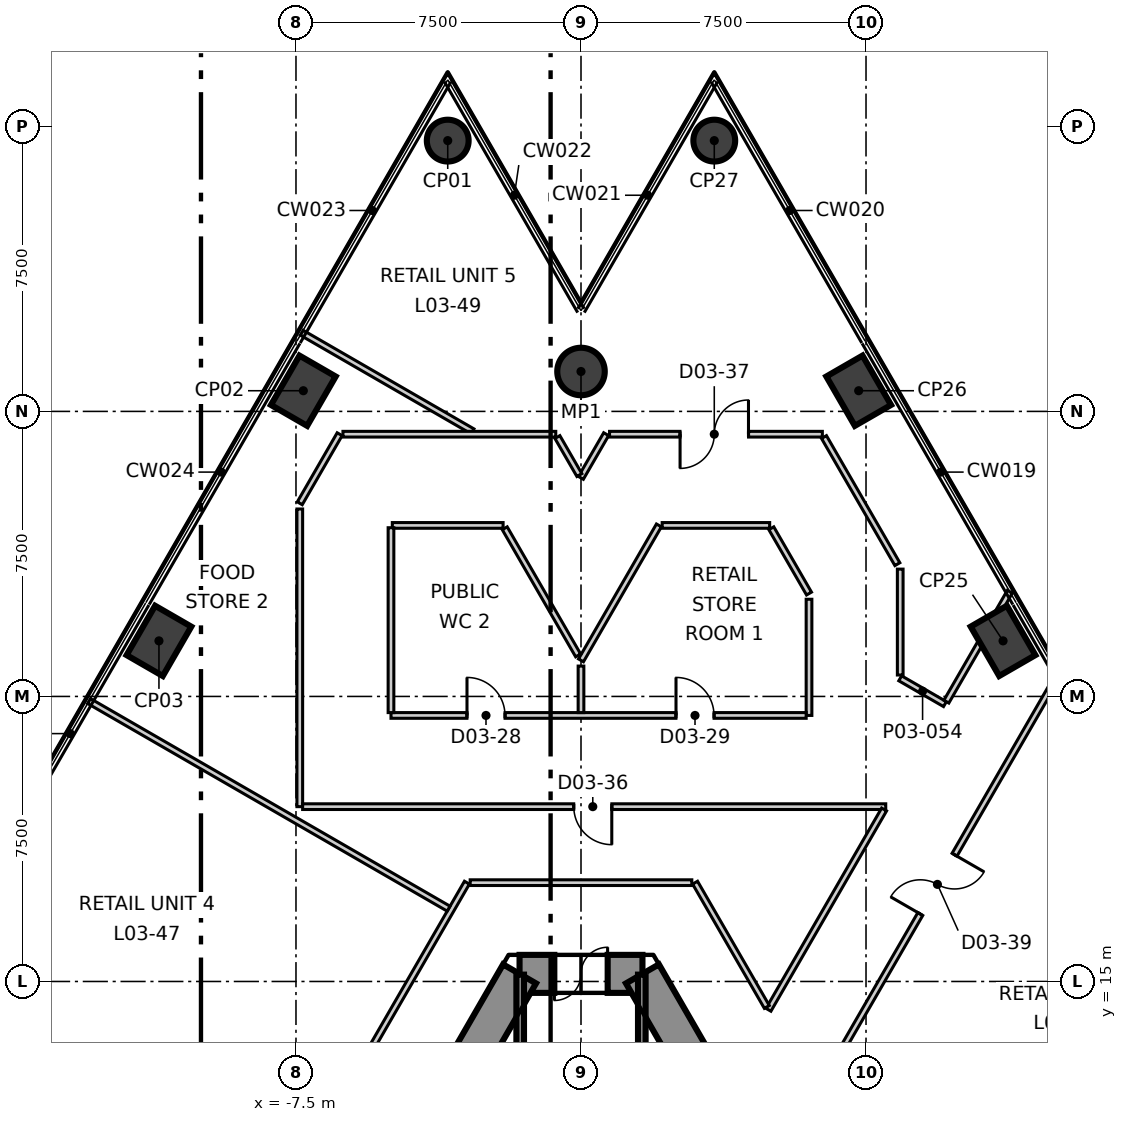
"""IFC4 building model, lengths in metres.
Left out: names, types, materials, properties, quantities, classifications, styles, units other than length and angle.
Written with IfcOpenShell. Run it as: python <this file> out.ifc"""

import sys

from ifc_helpers import new_model, si_unit, direction, frame, frame_2d, origin, origin_2d, place, context, subcontext, project, spatial, polyline, rectangle, circle, outline, extrude, element, fill, save


model = new_model("IFC4")
c1 = context("Model", 3, precision=1e-05, world=origin(), true_north=direction((0.0, 1.0)))
c2 = subcontext(c1, "Body", "Model", "MODEL_VIEW")
j1 = project(units=[si_unit("LENGTHUNIT", "METRE"), si_unit("PLANEANGLEUNIT", "RADIAN")], contexts=[c1])
p1 = place(None, origin())
s1 = spatial("IfcSite", under=j1, at=p1, CompositionType="ELEMENT")
p2 = place(p1, origin())
s2 = spatial("IfcBuilding", under=s1, at=p2, CompositionType="ELEMENT")
p3 = place(p2, frame((0.0, 0.0, 19.9)))
s3 = spatial("IfcBuildingStorey", under=s2, at=p3, CompositionType="ELEMENT", Elevation=19.9)
p4 = place(p3, frame((1.617, 15.2, -0.4), z_axis=(0.0, 0.0, 1.0), x_axis=(-1.0, 0.0, 0.0)))
e1 = element("IfcWall", 1, at=p4, inside=s3, PredefinedType="SHEAR", context=c2, shape_type="SweptSolid", body=[
    extrude(outline(polyline([(-0.288, -0.5), (1.617, -0.5), (3.522, -0.5), (2.945, 0.5), (1.617, 0.5), (0.289, 0.5), (-0.288, -0.5)])), origin(), (0.0, 0.0, 1.0), 5.4),
])
p5 = place(p4, frame((0.917, 0.0, 0.4)))
e2 = element("IfcOpeningElement", 2, at=p5, cuts=e1, PredefinedType="OPENING", context=c2, shape_type="SweptSolid", body=[
    extrude(rectangle(XDim=1.4, YDim=2.1, at=frame_2d((0.7, 1.05))), frame((0.0, 0.51, 0.0), z_axis=(0.0, -1.0, 0.0), x_axis=(1.0, 0.0, 0.0)), (0.0, 0.0, 1.0), 1.02),
])
p6 = place(p3, frame((-1.617, 15.2, -0.4), z_axis=(0.0, 0.0, 1.0), x_axis=(-0.499992141631, -0.866029940768, 0.0)))
e3 = element("IfcWall", 3, at=p6, inside=s3, PredefinedType="SHEAR", context=c2, shape_type="SweptSolid", body=[
    extrude(outline(polyline([(-0.289, -0.499), (1.656, -0.499), (3.601, -0.499), (5.547, -0.499), (7.492, -0.499), (9.437, -0.5), (11.382, -0.5), (13.328, -0.5), (15.273, -0.5), (17.218, -0.5), (19.163, -0.5), (21.109, -0.5), (23.054, -0.5), (24.999, -0.5), (24.422, 0.5), (22.566, 0.5), (20.709, 0.5), (18.853, 0.5), (16.997, 0.5), (15.14, 0.5), (13.284, 0.5), (11.427, 0.5), (9.571, 0.5), (7.715, 0.5), (5.858, 0.5), (4.002, 0.5), (2.146, 0.5), (0.289, 0.5), (-0.289, -0.499)])), origin(), (0.0, 0.0, 1.0), 5.4),
])
p7 = place(p6, frame((11.805, 0.0, 0.4)))
e4 = element("IfcOpeningElement", 4, at=p7, cuts=e3, PredefinedType="OPENING", context=c2, shape_type="SweptSolid", body=[
    extrude(rectangle(XDim=1.1, YDim=2.1, at=frame_2d((0.55, 1.05))), frame((0.0, 0.51, 0.0), z_axis=(0.0, -1.0, 0.0), x_axis=(1.0, 0.0, 0.0)), (0.0, 0.0, 1.0), 1.02),
])
p8 = place(p3, frame((13.972, -6.2, -0.4), z_axis=(0.0, 0.0, 1.0), x_axis=(-0.499992141631, 0.866029940768, 0.0)))
e5 = element("IfcWall", 5, at=p8, inside=s3, PredefinedType="SHEAR", context=c2, shape_type="SweptSolid", body=[
    extrude(outline(polyline([(-0.288, -0.5), (1.657, -0.5), (3.602, -0.5), (5.547, -0.5), (7.493, -0.5), (9.438, -0.5), (11.383, -0.5), (13.328, -0.5), (15.273, -0.5), (17.218, -0.499), (19.164, -0.499), (21.109, -0.499), (23.054, -0.499), (24.999, -0.499), (24.422, 0.5), (22.566, 0.5), (20.709, 0.5), (18.853, 0.5), (16.996, 0.5), (15.14, 0.5), (13.283, 0.5), (11.427, 0.5), (9.57, 0.5), (7.714, 0.5), (5.857, 0.5), (4.001, 0.5), (2.145, 0.5), (0.288, 0.5), (-0.288, -0.5)])), origin(), (0.0, 0.0, 1.0), 5.4),
])
p9 = place(p8, frame((11.455, 0.0, 0.4)))
e6 = element("IfcOpeningElement", 6, at=p9, cuts=e5, PredefinedType="OPENING", context=c2, shape_type="SweptSolid", body=[
    extrude(rectangle(XDim=1.8, YDim=2.1, at=frame_2d((0.9, 1.05))), frame((0.0, 0.51, 0.0), z_axis=(0.0, -1.0, 0.0), x_axis=(1.0, 0.0, 0.0)), (0.0, 0.0, 1.0), 1.02),
])
p10 = place(p3, frame((-3.507, 37.125, -0.4), z_axis=(0.0, 0.0, 1.0), x_axis=(0.5, 0.866025403784, 0.0)))
e7 = element("IfcColumn", 7, at=p10, inside=s3, PredefinedType="COLUMN", context=c2, shape_type="SweptSolid", body=[
    extrude(circle(Radius=0.55, at=origin_2d()), origin(), (0.0, 0.0, 1.0), 5.4),
])
for number, where, z_axis, x_axis in (
    (8, (-7.307, 30.544, -0.4), (0.0, 0.0, 1.0), (0.5, 0.866, 0.0)),
    (9, (-11.106, 23.962, -0.4), (0.0, 0.0, 1.0), (0.5, 0.866, 0.0)),
    (10, (11.106, 23.962, -0.4), (0.0, 0.0, 1.0), (-0.5, 0.866, 0.0)),
    (11, (7.307, 30.544, -0.4), (0.0, 0.0, 1.0), (-0.5, 0.866, 0.0)),
):
    element("IfcColumn", number, at=place(p3, frame(where, z_axis=z_axis, x_axis=x_axis)), inside=s3, PredefinedType="COLUMN", context=c2, shape_type="SweptSolid", body=[
        extrude(rectangle(XDim=1.5, YDim=1.1, at=origin_2d()), origin(), (0.0, 0.0, 1.0), 5.4),
    ])
p11 = place(p3, frame((3.507, 37.125, -0.4), z_axis=(0.0, 0.0, 1.0), x_axis=(-0.5, 0.866025403784, 0.0)))
e12 = element("IfcColumn", 12, at=p11, inside=s3, PredefinedType="COLUMN", context=c2, shape_type="SweptSolid", body=[
    extrude(circle(Radius=0.55, at=origin_2d()), origin(), (0.0, 0.0, 1.0), 5.4),
])
p12 = place(p3, frame((0.0, 31.05, -0.4), z_axis=(0.0, 0.0, 1.0), x_axis=(1.0, 0.0, 0.0)))
e13 = element("IfcColumn", 13, at=p12, inside=s3, PredefinedType="COLUMN", context=c2, shape_type="SweptSolid", body=[
    extrude(circle(Radius=0.625, at=origin_2d()), origin(), (0.0, 0.0, 1.0), 5.4),
])
p13 = place(p3, frame((-0.003, 28.251, 0.0), z_axis=(0.0, 0.0, 1.0), x_axis=(0.500644997499, 0.865652693913, 0.0)))
e14 = element("IfcWall", 14, at=p13, inside=s3, PredefinedType="PARTITIONING", context=c2, shape_type="SweptSolid", body=[
    extrude(rectangle(XDim=1.328, YDim=0.15, at=frame_2d((0.664, 0.0))), origin(), (0.0, 0.0, 1.0), 5.0),
])
p14 = place(p3, frame((-7.4, 27.582, 0.0), z_axis=(0.0, 0.0, 1.0), x_axis=(0.499742594395, 0.866173965983, 0.0)))
e15 = element("IfcWall", 15, at=p14, inside=s3, PredefinedType="PARTITIONING", context=c2, shape_type="SweptSolid", body=[
    extrude(rectangle(XDim=2.099, YDim=0.15, at=frame_2d((1.049, 0.0))), origin(), (0.0, 0.0, 1.0), 5.0),
])
p15 = place(p3, frame((-8.977, 7.252, 0.0), z_axis=(0.0, 0.0, 1.0), x_axis=(0.500037258536, 0.86600389149, 0.0)))
e16 = element("IfcWall", 16, at=p15, inside=s3, PredefinedType="PARTITIONING", context=c2, shape_type="SweptSolid", body=[
    extrude(rectangle(XDim=11.949, YDim=0.15, at=frame_2d((5.975, 0.0))), origin(), (0.0, 0.0, 1.0), 5.0),
])
p16 = place(p15, frame((4.62, 0.0, 0.0)))
e17 = element("IfcOpeningElement", 17, at=p16, cuts=e16, PredefinedType="OPENING", context=c2, shape_type="SweptSolid", body=[
    extrude(rectangle(XDim=1.8, YDim=2.1, at=frame_2d((0.9, 1.05))), frame((0.0, 0.085, 0.0), z_axis=(0.0, -1.0, 0.0), x_axis=(1.0, 0.0, 0.0)), (0.0, 0.0, 1.0), 0.17),
])
p17 = place(p3, frame((-12.945, 22.378, 0.0), z_axis=(0.0, 0.0, 1.0), x_axis=(0.866045288938, -0.499965556321, 0.0)))
e18 = element("IfcWall", 18, at=p17, inside=s3, PredefinedType="PARTITIONING", context=c2, shape_type="SweptSolid", body=[
    extrude(rectangle(XDim=10.925, YDim=0.15, at=frame_2d((5.462, 0.0))), origin(), (0.0, 0.0, 1.0), 5.0),
])
p18 = place(p3, frame((-7.349, 32.07, 0.0), z_axis=(0.0, 0.0, 1.0), x_axis=(0.866049297308, -0.49995861292, 0.0)))
e19 = element("IfcWall", 19, at=p18, inside=s3, PredefinedType="PARTITIONING", context=c2, shape_type="SweptSolid", body=[
    extrude(rectangle(XDim=5.19, YDim=0.15, at=frame_2d((2.595, 0.0))), origin(), (0.0, 0.0, 1.0), 5.0),
])
p19 = place(p3, frame((8.4, 22.977, 0.0), z_axis=(0.0, 0.0, 1.0), x_axis=(0.866212506108, -0.499675789149, 0.0)))
e20 = element("IfcWall", 20, at=p19, inside=s3, PredefinedType="PARTITIONING", context=c2, shape_type="SweptSolid", body=[
    extrude(rectangle(XDim=1.359, YDim=0.15, at=frame_2d((0.679, 0.0))), origin(), (0.0, 0.0, 1.0), 5.0),
])
p20 = place(p3, frame((-6.264, 29.4, 0.0), z_axis=(0.0, 0.0, 1.0), x_axis=(1.0, 0.0, 0.0)))
e21 = element("IfcWall", 21, at=p20, inside=s3, PredefinedType="PARTITIONING", context=c2, shape_type="SweptSolid", body=[
    extrude(rectangle(XDim=5.6, YDim=0.15, at=frame_2d((2.8, 0.0))), origin(), (0.0, 0.0, 1.0), 5.0),
])
p21 = place(p3, frame((0.751, 29.4, 0.0), z_axis=(0.0, 0.0, 1.0), x_axis=(1.0, 0.0, 0.0)))
e22 = element("IfcWall", 22, at=p21, inside=s3, PredefinedType="PARTITIONING", context=c2, shape_type="SweptSolid", body=[
    extrude(rectangle(XDim=5.6, YDim=0.15, at=frame_2d((2.8, 0.0))), origin(), (0.0, 0.0, 1.0), 5.0),
])
p22 = place(p21, frame((1.856, 0.0, 0.0)))
e23 = element("IfcOpeningElement", 23, at=p22, cuts=e22, PredefinedType="OPENING", context=c2, shape_type="SweptSolid", body=[
    extrude(rectangle(XDim=1.8, YDim=2.1, at=frame_2d((0.9, 1.05))), frame((0.0, 0.085, 0.0), z_axis=(0.0, -1.0, 0.0), x_axis=(1.0, 0.0, 0.0)), (0.0, 0.0, 1.0), 0.17),
])
p23 = place(p3, frame((-7.4, 19.6, 0.0), z_axis=(0.0, 0.0, 1.0), x_axis=(0.0, 1.0, 0.0)))
e24 = element("IfcWall", 24, at=p23, inside=s3, PredefinedType="PARTITIONING", context=c2, shape_type="SweptSolid", body=[
    extrude(rectangle(XDim=7.832, YDim=0.15, at=frame_2d((3.916, 0.0))), origin(), (0.0, 0.0, 1.0), 5.0),
])
p24 = place(p3, frame((-7.325, 19.6, 0.0), z_axis=(0.0, 0.0, 1.0), x_axis=(1.0, 0.0, 0.0)))
e25 = element("IfcWall", 25, at=p24, inside=s3, PredefinedType="PARTITIONING", context=c2, shape_type="SweptSolid", body=[
    extrude(rectangle(XDim=15.344, YDim=0.15, at=frame_2d((7.672, 0.0))), origin(), (0.0, 0.0, 1.0), 5.0),
])
p25 = place(p24, frame((7.135, 0.0, 0.0)))
e26 = element("IfcOpeningElement", 26, at=p25, cuts=e25, PredefinedType="OPENING", context=c2, shape_type="SweptSolid", body=[
    extrude(rectangle(XDim=1.0, YDim=2.1, at=frame_2d((0.5, 1.05))), frame((0.0, 0.085, 0.0), z_axis=(0.0, -1.0, 0.0), x_axis=(1.0, 0.0, 0.0)), (0.0, 0.0, 1.0), 0.17),
])
p26 = place(p3, frame((4.933, 14.255, 0.0), z_axis=(0.0, 0.0, 1.0), x_axis=(0.500039629421, 0.866002522519, 0.0)))
e27 = element("IfcWall", 27, at=p26, inside=s3, PredefinedType="PARTITIONING", context=c2, shape_type="SweptSolid", body=[
    extrude(rectangle(XDim=6.085, YDim=0.15, at=frame_2d((3.043, 0.0))), origin(), (0.0, 0.0, 1.0), 5.0),
])
p27 = place(p3, frame((9.614, 22.363, 0.0), z_axis=(0.0, 0.0, 1.0), x_axis=(0.500070516041, 0.865984687501, 0.0)))
e28 = element("IfcWall", 28, at=p27, inside=s3, PredefinedType="PARTITIONING", context=c2, shape_type="SweptSolid", body=[
    extrude(rectangle(XDim=3.339, YDim=0.15, at=frame_2d((1.67, 0.0))), origin(), (0.0, 0.0, 1.0), 4.4),
])
p28 = place(p3, frame((3.002, 17.6, 0.0), z_axis=(0.0, 0.0, 1.0), x_axis=(0.499998569178, -0.866026229868, 0.0)))
e29 = element("IfcWall", 29, at=p28, inside=s3, PredefinedType="PARTITIONING", context=c2, shape_type="SweptSolid", body=[
    extrude(rectangle(XDim=3.776, YDim=0.15, at=frame_2d((1.888, 0.0))), origin(), (0.0, 0.0, 1.0), 5.0),
])
p29 = place(p3, frame((-2.916, 17.6, 0.0), z_axis=(0.0, 0.0, 1.0), x_axis=(1.0, 0.0, 0.0)))
e30 = element("IfcWall", 30, at=p29, inside=s3, PredefinedType="PARTITIONING", context=c2, shape_type="SweptSolid", body=[
    extrude(rectangle(XDim=5.832, YDim=0.15, at=frame_2d((2.916, 0.0))), origin(), (0.0, 0.0, 1.0), 5.0),
])
p30 = place(p3, frame((8.4, 23.064, 0.0), z_axis=(0.0, 0.0, 1.0), x_axis=(0.0, 1.0, 0.0)))
e31 = element("IfcWall", 31, at=p30, inside=s3, PredefinedType="PARTITIONING", context=c2, shape_type="SweptSolid", body=[
    extrude(rectangle(XDim=2.786, YDim=0.15, at=frame_2d((1.393, 0.0))), origin(), (0.0, 0.0, 1.0), 5.0),
])
p31 = place(p3, frame((6.394, 29.325, 0.0), z_axis=(0.0, 0.0, 1.0), x_axis=(0.499939503595, -0.866060328583, 0.0)))
e32 = element("IfcWall", 32, at=p31, inside=s3, PredefinedType="PARTITIONING", context=c2, shape_type="SweptSolid", body=[
    extrude(rectangle(XDim=3.862, YDim=0.15, at=frame_2d((1.931, 0.0))), origin(), (0.0, 0.0, 1.0), 5.0),
])
p32 = place(p3, frame((-0.621, 29.325, 0.0), z_axis=(0.0, 0.0, 1.0), x_axis=(0.500502949238, -0.865734831114, 0.0)))
e33 = element("IfcWall", 33, at=p32, inside=s3, PredefinedType="PARTITIONING", context=c2, shape_type="SweptSolid", body=[
    extrude(rectangle(XDim=1.155, YDim=0.15, at=frame_2d((0.578, 0.0))), origin(), (0.0, 0.0, 1.0), 5.0),
])
p33 = place(p3, frame((0.0, 23.449, 0.0), z_axis=(0.0, 0.0, 1.0), x_axis=(0.499975007054, 0.866039832988, 0.0)))
e34 = element("IfcWall", 34, at=p33, inside=s3, PredefinedType="PARTITIONING", context=c2, shape_type="SweptSolid", body=[
    extrude(rectangle(XDim=4.1, YDim=0.15, at=frame_2d((2.05, 0.0))), origin(), (0.0, 0.0, 1.0), 5.0),
])
p34 = place(p3, frame((-4.965, 27.0, 0.0), z_axis=(0.0, 0.0, 1.0), x_axis=(1.0, 0.0, 0.0)))
e35 = element("IfcWall", 35, at=p34, inside=s3, PredefinedType="PARTITIONING", context=c2, shape_type="SweptSolid", body=[
    extrude(rectangle(XDim=2.915, YDim=0.15, at=frame_2d((1.458, 0.0))), origin(), (0.0, 0.0, 1.0), 5.0),
])
p35 = place(p3, frame((2.136, 27.0, 0.0), z_axis=(0.0, 0.0, 1.0), x_axis=(1.0, 0.0, 0.0)))
e36 = element("IfcWall", 36, at=p35, inside=s3, PredefinedType="PARTITIONING", context=c2, shape_type="SweptSolid", body=[
    extrude(rectangle(XDim=2.829, YDim=0.15, at=frame_2d((1.415, 0.0))), origin(), (0.0, 0.0, 1.0), 5.0),
])
p36 = place(p3, frame((5.008, 26.925, 0.0), z_axis=(0.0, 0.0, 1.0), x_axis=(0.500017181982, -0.866015483535, 0.0)))
e37 = element("IfcWall", 37, at=p36, inside=s3, PredefinedType="PARTITIONING", context=c2, shape_type="SweptSolid", body=[
    extrude(rectangle(XDim=1.984, YDim=0.15, at=frame_2d((0.992, 0.0))), origin(), (0.0, 0.0, 1.0), 5.0),
])
p37 = place(p3, frame((6.0, 22.0, 0.0), z_axis=(0.0, 0.0, 1.0), x_axis=(0.0, 1.0, 0.0)))
e38 = element("IfcWall", 38, at=p37, inside=s3, PredefinedType="PARTITIONING", context=c2, shape_type="SweptSolid", body=[
    extrude(rectangle(XDim=3.057, YDim=0.15, at=frame_2d((1.528, 0.0))), origin(), (0.0, 0.0, 1.0), 4.25),
])
p38 = place(p3, frame((-5.0, 22.0, 0.0), z_axis=(0.0, 0.0, 1.0), x_axis=(1.0, 0.0, 0.0)))
e39 = element("IfcWall", 39, at=p38, inside=s3, PredefinedType="PARTITIONING", context=c2, shape_type="SweptSolid", body=[
    extrude(rectangle(XDim=10.925, YDim=0.15, at=frame_2d((5.462, 0.0))), origin(), (0.0, 0.0, 1.0), 5.0),
])
p39 = place(p38, frame((2.0, 0.0, 0.0)))
e40 = element("IfcOpeningElement", 40, at=p39, cuts=e39, PredefinedType="OPENING", context=c2, shape_type="SweptSolid", body=[
    extrude(rectangle(XDim=1.0, YDim=2.1, at=frame_2d((0.5, 1.05))), frame((0.0, 0.085, 0.0), z_axis=(0.0, -1.0, 0.0), x_axis=(1.0, 0.0, 0.0)), (0.0, 0.0, 1.0), 0.17),
])
p40 = place(p38, frame((7.5, 0.0, 0.0)))
e41 = element("IfcOpeningElement", 41, at=p40, cuts=e39, PredefinedType="OPENING", context=c2, shape_type="SweptSolid", body=[
    extrude(rectangle(XDim=1.0, YDim=2.1, at=frame_2d((0.5, 1.05))), frame((0.0, 0.085, 0.0), z_axis=(0.0, -1.0, 0.0), x_axis=(1.0, 0.0, 0.0)), (0.0, 0.0, 1.0), 0.17),
])
p41 = place(p3, frame((0.0, 22.075, 0.0), z_axis=(0.0, 0.0, 1.0), x_axis=(0.0, 1.0, 0.0)))
e42 = element("IfcWall", 42, at=p41, inside=s3, PredefinedType="PARTITIONING", context=c2, shape_type="SweptSolid", body=[
    extrude(rectangle(XDim=1.224, YDim=0.15, at=frame_2d((0.612, 0.0))), origin(), (0.0, 0.0, 1.0), 4.35),
])
p42 = place(p3, frame((-5.0, 22.075, 0.0), z_axis=(0.0, 0.0, 1.0), x_axis=(0.0, 1.0, 0.0)))
e43 = element("IfcWall", 43, at=p42, inside=s3, PredefinedType="PARTITIONING", context=c2, shape_type="SweptSolid", body=[
    extrude(rectangle(XDim=4.864, YDim=0.15, at=frame_2d((2.432, 0.0))), origin(), (0.0, 0.0, 1.0), 4.25),
])
p43 = place(p3, frame((-2.007, 26.925, 0.0), z_axis=(0.0, 0.0, 1.0), x_axis=(0.500067035576, -0.865986697317, 0.0)))
e44 = element("IfcWall", 44, at=p43, inside=s3, PredefinedType="PARTITIONING", context=c2, shape_type="SweptSolid", body=[
    extrude(rectangle(XDim=3.864, YDim=0.15, at=frame_2d((1.932, 0.0))), origin(), (0.0, 0.0, 1.0), 5.0),
])
p44 = place(p3, frame((6.247, 12.13, 0.0), z_axis=(0.0, 0.0, 1.0), x_axis=(0.49995867205, 0.866049263173, 0.0)))
e45 = element("IfcWall", 45, at=p44, inside=s3, PredefinedType="PARTITIONING", context=c2, shape_type="SweptSolid", body=[
    extrude(rectangle(XDim=12.615, YDim=0.15, at=frame_2d((6.307, 0.0))), origin(), (0.0, 0.0, 1.0), 5.0),
])
p45 = place(p44, frame((5.364, 0.0, 0.0)))
e46 = element("IfcOpeningElement", 46, at=p45, cuts=e45, PredefinedType="OPENING", context=c2, shape_type="SweptSolid", body=[
    extrude(rectangle(XDim=1.8, YDim=2.1, at=frame_2d((0.9, 1.05))), frame((0.0, 0.085, 0.0), z_axis=(0.0, -1.0, 0.0), x_axis=(1.0, 0.0, 0.0)), (0.0, 0.0, 1.0), 0.17),
])
for number, where, z_axis, x_axis in (
    (47, (1.6, 6.615, 0.0), (0.0, 0.0, 1.0), (0.0, 1.0, 0.0)),
    (48, (-1.6, 6.615, 0.0), (0.0, 0.0, 1.0), (0.0, 1.0, 0.0)),
):
    element("IfcWall", number, at=place(p3, frame(where, z_axis=z_axis, x_axis=x_axis)), inside=s3, PredefinedType="SOLIDWALL", context=c2, shape_type="SweptSolid", body=[
        extrude(rectangle(XDim=8.565, YDim=0.2, at=frame_2d((4.282, 0.0))), origin(), (0.0, 0.0, 1.0), 5.0),
    ])
p46 = place(p39, origin())
e49 = element("IfcDoor", 49, at=p46, inside=s3, OperationType="SINGLE_SWING_RIGHT", PredefinedType="DOOR", context=c2, shape_type="SweptSolid", body=[
    extrude(rectangle(XDim=1.0, YDim=2.1, at=frame_2d((0.5, 1.05))), frame((0.0, 0.025, 0.0), z_axis=(0.0, -1.0, 0.0), x_axis=(1.0, 0.0, 0.0)), (0.0, 0.0, 1.0), 0.05),
])
fill(e40, e49)
p47 = place(p40, origin())
e50 = element("IfcDoor", 50, at=p47, inside=s3, OperationType="SINGLE_SWING_RIGHT", PredefinedType="DOOR", context=c2, shape_type="SweptSolid", body=[
    extrude(rectangle(XDim=1.0, YDim=2.1, at=frame_2d((0.5, 1.05))), frame((0.0, 0.025, 0.0), z_axis=(0.0, -1.0, 0.0), x_axis=(1.0, 0.0, 0.0)), (0.0, 0.0, 1.0), 0.05),
])
fill(e41, e50)
p48 = place(p25, origin())
e51 = element("IfcDoor", 51, at=p48, inside=s3, OperationType="SINGLE_SWING_RIGHT", PredefinedType="DOOR", context=c2, shape_type="SweptSolid", body=[
    extrude(rectangle(XDim=1.0, YDim=2.1, at=frame_2d((0.5, 1.05))), frame((0.0, 0.025, 0.0), z_axis=(0.0, -1.0, 0.0), x_axis=(1.0, 0.0, 0.0)), (0.0, 0.0, 1.0), 0.05),
])
fill(e26, e51)
p49 = place(p22, origin())
e52 = element("IfcDoor", 52, at=p49, inside=s3, OperationType="DOUBLE_DOOR_SINGLE_SWING", PredefinedType="DOOR", context=c2, shape_type="SweptSolid", body=[
    extrude(rectangle(XDim=1.8, YDim=2.1, at=frame_2d((0.9, 1.05))), frame((0.0, 0.025, 0.0), z_axis=(0.0, -1.0, 0.0), x_axis=(1.0, 0.0, 0.0)), (0.0, 0.0, 1.0), 0.05),
])
fill(e23, e52)
p50 = place(p45, origin())
e53 = element("IfcDoor", 53, at=p50, inside=s3, OperationType="DOUBLE_DOOR_SINGLE_SWING", PredefinedType="DOOR", context=c2, shape_type="SweptSolid", body=[
    extrude(rectangle(XDim=1.8, YDim=2.1, at=frame_2d((0.9, 1.05))), frame((0.0, 0.025, 0.0), z_axis=(0.0, -1.0, 0.0), x_axis=(1.0, 0.0, 0.0)), (0.0, 0.0, 1.0), 0.05),
])
fill(e46, e53)
p51 = place(p5, origin())
e54 = element("IfcDoor", 54, at=p51, inside=s3, OperationType="DOUBLE_DOOR_SINGLE_SWING", PredefinedType="DOOR", context=c2, shape_type="SweptSolid", body=[
    extrude(rectangle(XDim=1.4, YDim=2.1, at=frame_2d((0.7, 1.05))), frame((0.0, 0.025, 0.0), z_axis=(0.0, -1.0, 0.0), x_axis=(1.0, 0.0, 0.0)), (0.0, 0.0, 1.0), 0.05),
])
fill(e2, e54)
save(model, sys.argv[1])
